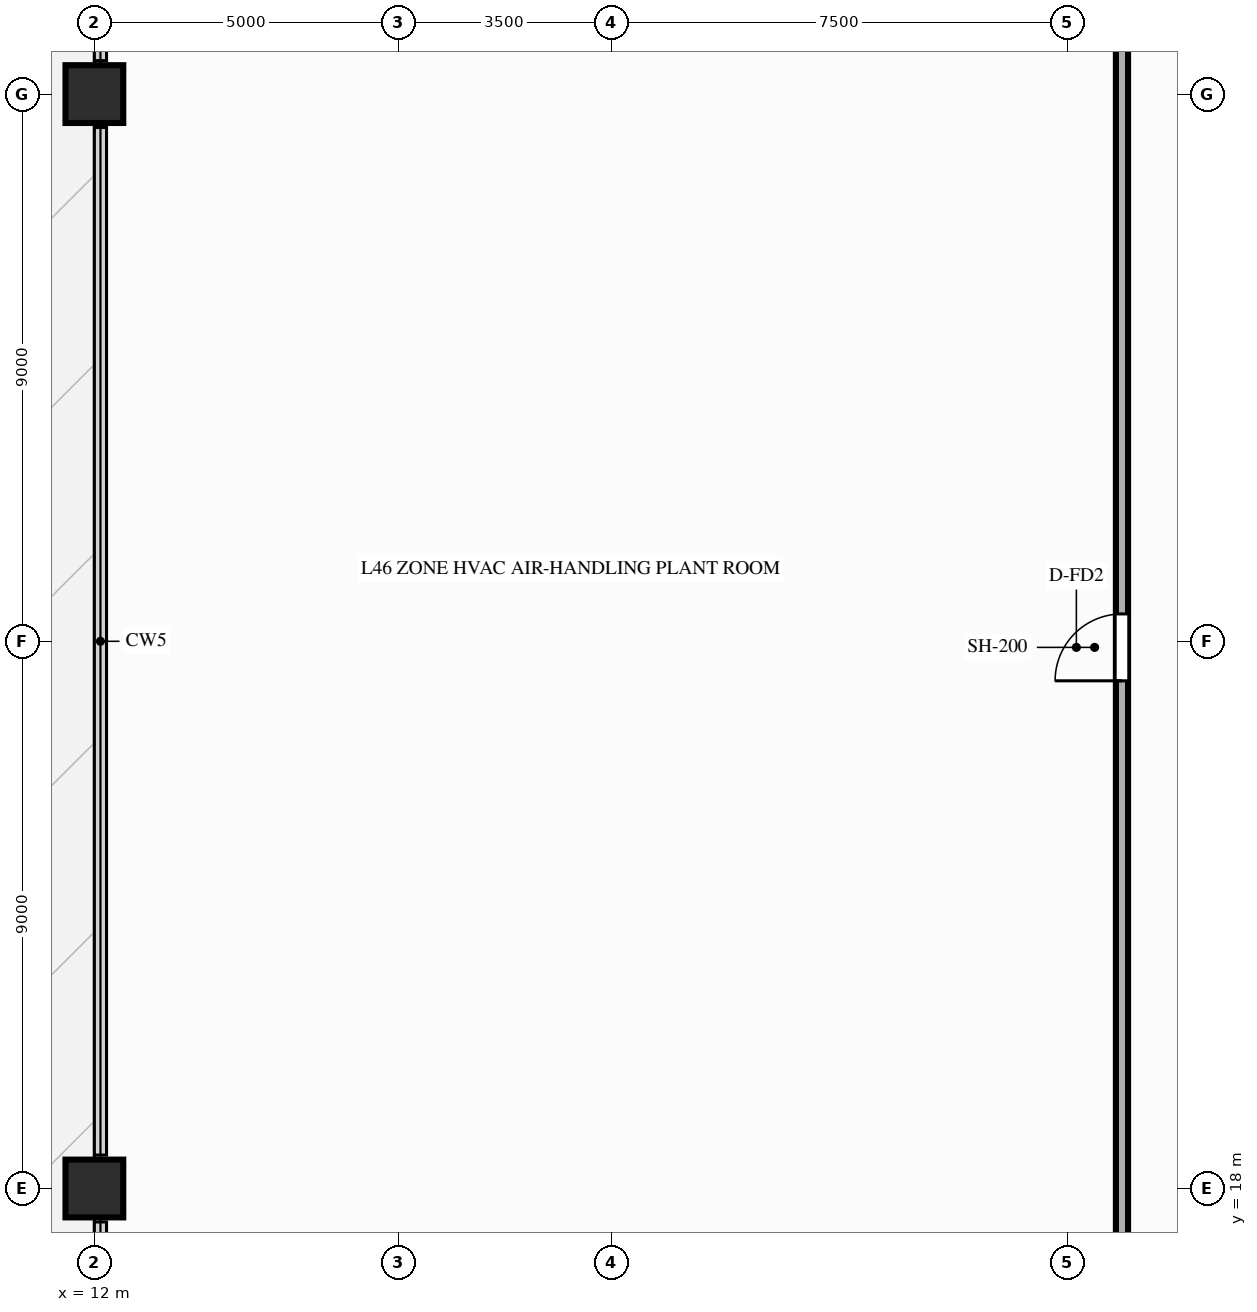
"""IFC4 building model, lengths in metres.
Left out: names, types, materials, properties, quantities, classifications, styles, units other than length and angle.
Written with IfcOpenShell. Run it as: python <this file> out.ifc"""

import sys

from ifc_helpers import new_model, si_unit, direction, frame, frame_2d, origin, origin_2d, place, context, subcontext, project, spatial, rectangle, extrude, source, transform, mapped, element, fill, save


model = new_model("IFC4")
c1 = context("Model", 3, precision=1e-05, world=origin(), true_north=direction((0.0, 1.0)))
c2 = subcontext(c1, "Body", "Model", "MODEL_VIEW")
j1 = project(units=[si_unit("LENGTHUNIT", "METRE"), si_unit("PLANEANGLEUNIT", "RADIAN")], contexts=[c1])
p1 = place(None, origin())
s1 = spatial("IfcSite", under=j1, at=p1, CompositionType="ELEMENT")
p2 = place(p1, origin())
s2 = spatial("IfcBuilding", under=s1, at=p2, CompositionType="ELEMENT")
p3 = place(p2, frame((0.0, 0.0, 144.75)))
s3 = spatial("IfcBuildingStorey", under=s2, at=p3, CompositionType="ELEMENT", Elevation=144.75)
m1 = source(origin(), c2, "Body", "SweptSolid", [
    extrude(rectangle(XDim=0.95, YDim=0.95, at=origin_2d()), origin(), (0.0, 0.0, 1.0), 3.95),
])
for number, where, z_axis, x_axis in (
    (1, (12.0, 36.0, 0.0), (0.0, 0.0, 1.0), (1.0, 0.0, 0.0)),
    (2, (12.0, 18.0, 0.0), (0.0, 0.0, 1.0), (1.0, 0.0, 0.0)),
):
    element("IfcColumn", number, at=place(p3, frame(where, z_axis=z_axis, x_axis=x_axis)), inside=s3, PredefinedType="COLUMN", context=c2, shape_type="MappedRepresentation", body=[
        mapped(m1, transform((0.0, 0.0, 0.0), scale=1.0)),
    ])
p4 = place(p3, frame((28.9, 14.5, 0.0), z_axis=(0.0, 0.0, 1.0), x_axis=(0.0, 1.0, 0.0)))
e3 = element("IfcWall", 3, at=p4, inside=s3, PredefinedType="PARTITIONING", context=c2, shape_type="SweptSolid", body=[
    extrude(rectangle(XDim=24.8, YDim=0.2, at=frame_2d((12.4, 0.0))), origin(), (0.0, 0.0, 1.0), 3.61),
])
p5 = place(p4, frame((11.85, 0.0, 0.0)))
e4 = element("IfcOpeningElement", 4, at=p5, cuts=e3, PredefinedType="OPENING", context=c2, shape_type="SweptSolid", body=[
    extrude(rectangle(XDim=1.1, YDim=2.15, at=frame_2d((0.55, 1.075))), frame((0.0, 0.112, 0.0), z_axis=(0.0, -1.0, 0.0), x_axis=(1.0, 0.0, 0.0)), (0.0, 0.0, 1.0), 0.224),
])
m2 = source(origin(), c2, "Body", "SweptSolid", [
    extrude(rectangle(XDim=1.1, YDim=2.15, at=frame_2d((0.55, 1.075))), frame((0.0, 0.025, 0.0), z_axis=(0.0, -1.0, 0.0), x_axis=(1.0, 0.0, 0.0)), (0.0, 0.0, 1.0), 0.05),
])
p6 = place(p5, origin())
e5 = element("IfcDoor", 5, at=p6, inside=s3, OperationType="SINGLE_SWING_LEFT", PredefinedType="DOOR", context=c2, shape_type="MappedRepresentation", body=[
    mapped(m2, transform((0.0, 0.0, 0.0), scale=1.0)),
])
fill(e4, e5)
save(model, sys.argv[1])
